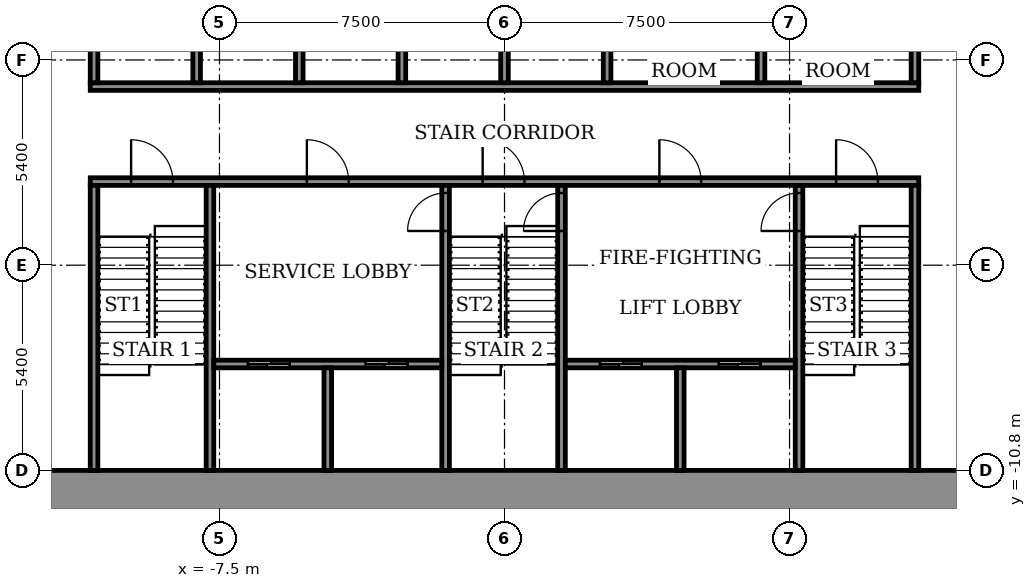
"""IFC4 building model, lengths in metres.
Left out: names, types, materials, properties, quantities, classifications, styles, units other than length and angle.
Written with IfcOpenShell. Run it as: python <this file> out.ifc"""

import sys

from ifc_helpers import new_model, si_unit, direction, frame, frame_2d, origin, place, context, subcontext, project, spatial, rectangle, extrude, element, fill, save


model = new_model("IFC4")
c1 = context("Model", 3, precision=1e-05, world=origin(), true_north=direction((0.0, 1.0)))
c2 = subcontext(c1, "Body", "Model", "MODEL_VIEW")
j1 = project(units=[si_unit("LENGTHUNIT", "METRE"), si_unit("PLANEANGLEUNIT", "RADIAN")], contexts=[c1])
p1 = place(None, origin())
s1 = spatial("IfcSite", under=j1, at=p1, CompositionType="ELEMENT")
p2 = place(p1, origin())
s2 = spatial("IfcBuilding", under=s1, at=p2, CompositionType="ELEMENT")
p3 = place(p2, frame((0.0, 0.0, 29.5)))
s3 = spatial("IfcBuildingStorey", under=s2, at=p3, CompositionType="ELEMENT", Elevation=29.5)
p4 = place(p3, frame((-15.0, -11.4, 0.0), z_axis=(0.0, 0.0, 1.0), x_axis=(1.0, 0.0, 0.0)))
e1 = element("IfcWall", 1, at=p4, inside=s3, PredefinedType="SHEAR", context=c2, shape_type="SweptSolid", body=[
    extrude(rectangle(XDim=30.0, YDim=1.2, at=frame_2d((15.0, 0.0))), origin(), (0.0, 0.0, 1.0), 4.6),
])
p5 = place(p3, frame((-10.9, -3.2, 0.0), z_axis=(0.0, 0.0, 1.0), x_axis=(1.0, 0.0, 0.0)))
e2 = element("IfcWall", 2, at=p5, inside=s3, PredefinedType="SHEAR", context=c2, shape_type="SweptSolid", body=[
    extrude(rectangle(XDim=21.8, YDim=0.2, at=frame_2d((10.9, 0.0))), origin(), (0.0, 0.0, 1.0), 4.05),
])
p6 = place(p5, frame((1.075, 0.0, 0.0)))
e3 = element("IfcOpeningElement", 3, at=p6, cuts=e2, PredefinedType="OPENING", context=c2, shape_type="SweptSolid", body=[
    extrude(rectangle(XDim=1.1, YDim=2.1, at=frame_2d((0.55, 1.05))), frame((0.0, 0.11, 0.0), z_axis=(0.0, -1.0, 0.0), x_axis=(1.0, 0.0, 0.0)), (0.0, 0.0, 1.0), 0.22),
])
p7 = place(p5, frame((10.325, 0.0, 0.0)))
e4 = element("IfcOpeningElement", 4, at=p7, cuts=e2, PredefinedType="OPENING", context=c2, shape_type="SweptSolid", body=[
    extrude(rectangle(XDim=1.1, YDim=2.1, at=frame_2d((0.55, 1.05))), frame((0.0, 0.11, 0.0), z_axis=(0.0, -1.0, 0.0), x_axis=(1.0, 0.0, 0.0)), (0.0, 0.0, 1.0), 0.22),
])
p8 = place(p5, frame((19.625, 0.0, 0.0)))
e5 = element("IfcOpeningElement", 5, at=p8, cuts=e2, PredefinedType="OPENING", context=c2, shape_type="SweptSolid", body=[
    extrude(rectangle(XDim=1.1, YDim=2.1, at=frame_2d((0.55, 1.05))), frame((0.0, 0.11, 0.0), z_axis=(0.0, -1.0, 0.0), x_axis=(1.0, 0.0, 0.0)), (0.0, 0.0, 1.0), 0.22),
])
p9 = place(p5, frame((5.7, 0.0, 0.0)))
e6 = element("IfcOpeningElement", 6, at=p9, cuts=e2, PredefinedType="OPENING", context=c2, shape_type="SweptSolid", body=[
    extrude(rectangle(XDim=1.1, YDim=2.1, at=frame_2d((0.55, 1.05))), frame((0.0, 0.11, 0.0), z_axis=(0.0, -1.0, 0.0), x_axis=(1.0, 0.0, 0.0)), (0.0, 0.0, 1.0), 0.22),
])
p10 = place(p5, frame((14.975, 0.0, 0.0)))
e7 = element("IfcOpeningElement", 7, at=p10, cuts=e2, PredefinedType="OPENING", context=c2, shape_type="SweptSolid", body=[
    extrude(rectangle(XDim=1.1, YDim=2.1, at=frame_2d((0.55, 1.05))), frame((0.0, 0.11, 0.0), z_axis=(0.0, -1.0, 0.0), x_axis=(1.0, 0.0, 0.0)), (0.0, 0.0, 1.0), 0.22),
])
p11 = place(p3, frame((-10.9, -0.7, 0.0), z_axis=(0.0, 0.0, 1.0), x_axis=(1.0, 0.0, 0.0)))
e8 = element("IfcWall", 8, at=p11, inside=s3, PredefinedType="SHEAR", context=c2, shape_type="SweptSolid", body=[
    extrude(rectangle(XDim=21.8, YDim=0.2, at=frame_2d((10.9, 0.0))), origin(), (0.0, 0.0, 1.0), 4.05),
])
for number, where, z_axis, x_axis in (
    (9, (-10.8, -10.8, 0.0), (0.0, 0.0, 1.0), (0.0, 1.0, 0.0)),
    (10, (-7.75, -10.8, 0.0), (0.0, 0.0, 1.0), (0.0, 1.0, 0.0)),
):
    element("IfcWall", number, at=place(p3, frame(where, z_axis=z_axis, x_axis=x_axis)), inside=s3, PredefinedType="SHEAR", context=c2, shape_type="SweptSolid", body=[
        extrude(rectangle(XDim=7.5, YDim=0.2, at=frame_2d((3.75, 0.0))), origin(), (0.0, 0.0, 1.0), 4.05),
    ])
p12 = place(p3, frame((-1.55, -10.8, 0.0), z_axis=(0.0, 0.0, 1.0), x_axis=(0.0, 1.0, 0.0)))
e11 = element("IfcWall", 11, at=p12, inside=s3, PredefinedType="SHEAR", context=c2, shape_type="SweptSolid", body=[
    extrude(rectangle(XDim=7.5, YDim=0.2, at=frame_2d((3.75, 0.0))), origin(), (0.0, 0.0, 1.0), 4.05),
])
p13 = place(p12, frame((6.3, 0.0, 0.0)))
e12 = element("IfcOpeningElement", 12, at=p13, cuts=e11, PredefinedType="OPENING", context=c2, shape_type="SweptSolid", body=[
    extrude(rectangle(XDim=1.0, YDim=2.1, at=frame_2d((0.5, 1.05))), frame((0.0, 0.11, 0.0), z_axis=(0.0, -1.0, 0.0), x_axis=(1.0, 0.0, 0.0)), (0.0, 0.0, 1.0), 0.22),
])
p14 = place(p3, frame((1.5, -10.8, 0.0), z_axis=(0.0, 0.0, 1.0), x_axis=(0.0, 1.0, 0.0)))
e13 = element("IfcWall", 13, at=p14, inside=s3, PredefinedType="SHEAR", context=c2, shape_type="SweptSolid", body=[
    extrude(rectangle(XDim=7.5, YDim=0.2, at=frame_2d((3.75, 0.0))), origin(), (0.0, 0.0, 1.0), 4.05),
])
p15 = place(p14, frame((6.3, 0.0, 0.0)))
e14 = element("IfcOpeningElement", 14, at=p15, cuts=e13, PredefinedType="OPENING", context=c2, shape_type="SweptSolid", body=[
    extrude(rectangle(XDim=1.0, YDim=2.1, at=frame_2d((0.5, 1.05))), frame((0.0, 0.11, 0.0), z_axis=(0.0, -1.0, 0.0), x_axis=(1.0, 0.0, 0.0)), (0.0, 0.0, 1.0), 0.22),
])
p16 = place(p3, frame((7.75, -10.8, 0.0), z_axis=(0.0, 0.0, 1.0), x_axis=(0.0, 1.0, 0.0)))
e15 = element("IfcWall", 15, at=p16, inside=s3, PredefinedType="SHEAR", context=c2, shape_type="SweptSolid", body=[
    extrude(rectangle(XDim=7.5, YDim=0.2, at=frame_2d((3.75, 0.0))), origin(), (0.0, 0.0, 1.0), 4.05),
])
p17 = place(p16, frame((6.3, 0.0, 0.0)))
e16 = element("IfcOpeningElement", 16, at=p17, cuts=e15, PredefinedType="OPENING", context=c2, shape_type="SweptSolid", body=[
    extrude(rectangle(XDim=1.0, YDim=2.1, at=frame_2d((0.5, 1.05))), frame((0.0, 0.11, 0.0), z_axis=(0.0, -1.0, 0.0), x_axis=(1.0, 0.0, 0.0)), (0.0, 0.0, 1.0), 0.22),
])
p18 = place(p3, frame((10.8, -10.8, 0.0), z_axis=(0.0, 0.0, 1.0), x_axis=(0.0, 1.0, 0.0)))
e17 = element("IfcWall", 17, at=p18, inside=s3, PredefinedType="SHEAR", context=c2, shape_type="SweptSolid", body=[
    extrude(rectangle(XDim=7.5, YDim=0.2, at=frame_2d((3.75, 0.0))), origin(), (0.0, 0.0, 1.0), 4.05),
])
p19 = place(p3, frame((-7.65, -8.0, 0.0), z_axis=(0.0, 0.0, 1.0), x_axis=(1.0, 0.0, 0.0)))
e18 = element("IfcWall", 18, at=p19, inside=s3, PredefinedType="SHEAR", context=c2, shape_type="SweptSolid", body=[
    extrude(rectangle(XDim=6.0, YDim=0.2, at=frame_2d((3.0, 0.0))), origin(), (0.0, 0.0, 1.0), 4.05),
])
p20 = place(p19, frame((0.9, 0.0, 0.0)))
e19 = element("IfcOpeningElement", 19, at=p20, cuts=e18, PredefinedType="OPENING", context=c2, shape_type="SweptSolid", body=[
    extrude(rectangle(XDim=1.1, YDim=2.1, at=frame_2d((0.55, 1.05))), frame((0.0, 0.11, 0.0), z_axis=(0.0, -1.0, 0.0), x_axis=(1.0, 0.0, 0.0)), (0.0, 0.0, 1.0), 0.22),
])
p21 = place(p19, frame((4.0, 0.0, 0.0)))
e20 = element("IfcOpeningElement", 20, at=p21, cuts=e18, PredefinedType="OPENING", context=c2, shape_type="SweptSolid", body=[
    extrude(rectangle(XDim=1.1, YDim=2.1, at=frame_2d((0.55, 1.05))), frame((0.0, 0.11, 0.0), z_axis=(0.0, -1.0, 0.0), x_axis=(1.0, 0.0, 0.0)), (0.0, 0.0, 1.0), 0.22),
])
p22 = place(p3, frame((-4.65, -10.8, 0.0), z_axis=(0.0, 0.0, 1.0), x_axis=(0.0, 1.0, 0.0)))
e21 = element("IfcWall", 21, at=p22, inside=s3, PredefinedType="SHEAR", context=c2, shape_type="SweptSolid", body=[
    extrude(rectangle(XDim=2.7, YDim=0.2, at=frame_2d((1.35, 0.0))), origin(), (0.0, 0.0, 1.0), 4.05),
])
p23 = place(p3, frame((1.6, -8.0, 0.0), z_axis=(0.0, 0.0, 1.0), x_axis=(1.0, 0.0, 0.0)))
e22 = element("IfcWall", 22, at=p23, inside=s3, PredefinedType="SHEAR", context=c2, shape_type="SweptSolid", body=[
    extrude(rectangle(XDim=6.05, YDim=0.2, at=frame_2d((3.025, 0.0))), origin(), (0.0, 0.0, 1.0), 4.05),
])
p24 = place(p23, frame((0.913, 0.0, 0.0)))
e23 = element("IfcOpeningElement", 23, at=p24, cuts=e22, PredefinedType="OPENING", context=c2, shape_type="SweptSolid", body=[
    extrude(rectangle(XDim=1.1, YDim=2.1, at=frame_2d((0.55, 1.05))), frame((0.0, 0.11, 0.0), z_axis=(0.0, -1.0, 0.0), x_axis=(1.0, 0.0, 0.0)), (0.0, 0.0, 1.0), 0.22),
])
p25 = place(p23, frame((4.038, 0.0, 0.0)))
e24 = element("IfcOpeningElement", 24, at=p25, cuts=e22, PredefinedType="OPENING", context=c2, shape_type="SweptSolid", body=[
    extrude(rectangle(XDim=1.1, YDim=2.1, at=frame_2d((0.55, 1.05))), frame((0.0, 0.11, 0.0), z_axis=(0.0, -1.0, 0.0), x_axis=(1.0, 0.0, 0.0)), (0.0, 0.0, 1.0), 0.22),
])
p26 = place(p3, frame((4.625, -10.8, 0.0), z_axis=(0.0, 0.0, 1.0), x_axis=(0.0, 1.0, 0.0)))
e25 = element("IfcWall", 25, at=p26, inside=s3, PredefinedType="SHEAR", context=c2, shape_type="SweptSolid", body=[
    extrude(rectangle(XDim=2.7, YDim=0.2, at=frame_2d((1.35, 0.0))), origin(), (0.0, 0.0, 1.0), 4.05),
])
for number, where, z_axis, x_axis in (
    (26, (-10.8, -0.6, 0.0), (0.0, 0.0, 1.0), (0.0, 1.0, 0.0)),
    (27, (-8.1, -0.6, 0.0), (0.0, 0.0, 1.0), (0.0, 1.0, 0.0)),
    (28, (-5.4, -0.6, 0.0), (0.0, 0.0, 1.0), (0.0, 1.0, 0.0)),
    (29, (-2.7, -0.6, 0.0), (0.0, 0.0, 1.0), (0.0, 1.0, 0.0)),
    (30, (0.0, -0.6, 0.0), (0.0, 0.0, 1.0), (0.0, 1.0, 0.0)),
    (31, (2.7, -0.6, 0.0), (0.0, 0.0, 1.0), (0.0, 1.0, 0.0)),
):
    element("IfcWall", number, at=place(p3, frame(where, z_axis=z_axis, x_axis=x_axis)), inside=s3, PredefinedType="SHEAR", context=c2, shape_type="SweptSolid", body=[
        extrude(rectangle(XDim=2.5, YDim=0.2, at=frame_2d((1.25, 0.0))), origin(), (0.0, 0.0, 1.0), 4.05),
    ])
for number, where, z_axis, x_axis in (
    (32, (6.75, -0.6, 0.0), (0.0, 0.0, 1.0), (0.0, 1.0, 0.0)),
    (33, (10.8, -0.6, 0.0), (0.0, 0.0, 1.0), (0.0, 1.0, 0.0)),
):
    element("IfcWall", number, at=place(p3, frame(where, z_axis=z_axis, x_axis=x_axis)), inside=s3, PredefinedType="STANDARD", context=c2, shape_type="SweptSolid", body=[
        extrude(rectangle(XDim=2.5, YDim=0.2, at=frame_2d((1.25, 0.0))), origin(), (0.0, 0.0, 1.0), 4.05),
    ])
p27 = place(p24, origin())
e34 = element("IfcDoor", 34, at=p27, inside=s3, OperationType="SLIDING_TO_LEFT", PredefinedType="DOOR", context=c2, shape_type="SweptSolid", body=[
    extrude(rectangle(XDim=1.1, YDim=2.1, at=frame_2d((0.55, 1.05))), frame((0.0, 0.025, 0.0), z_axis=(0.0, -1.0, 0.0), x_axis=(1.0, 0.0, 0.0)), (0.0, 0.0, 1.0), 0.05),
])
fill(e23, e34)
p28 = place(p20, origin())
e35 = element("IfcDoor", 35, at=p28, inside=s3, OperationType="SLIDING_TO_LEFT", PredefinedType="DOOR", context=c2, shape_type="SweptSolid", body=[
    extrude(rectangle(XDim=1.1, YDim=2.1, at=frame_2d((0.55, 1.05))), frame((0.0, 0.025, 0.0), z_axis=(0.0, -1.0, 0.0), x_axis=(1.0, 0.0, 0.0)), (0.0, 0.0, 1.0), 0.05),
])
fill(e19, e35)
p29 = place(p25, origin())
e36 = element("IfcDoor", 36, at=p29, inside=s3, OperationType="SLIDING_TO_LEFT", PredefinedType="DOOR", context=c2, shape_type="SweptSolid", body=[
    extrude(rectangle(XDim=1.1, YDim=2.1, at=frame_2d((0.55, 1.05))), frame((0.0, 0.025, 0.0), z_axis=(0.0, -1.0, 0.0), x_axis=(1.0, 0.0, 0.0)), (0.0, 0.0, 1.0), 0.05),
])
fill(e24, e36)
p30 = place(p21, origin())
e37 = element("IfcDoor", 37, at=p30, inside=s3, OperationType="SLIDING_TO_LEFT", PredefinedType="DOOR", context=c2, shape_type="SweptSolid", body=[
    extrude(rectangle(XDim=1.1, YDim=2.1, at=frame_2d((0.55, 1.05))), frame((0.0, 0.025, 0.0), z_axis=(0.0, -1.0, 0.0), x_axis=(1.0, 0.0, 0.0)), (0.0, 0.0, 1.0), 0.05),
])
fill(e20, e37)
p31 = place(p6, origin())
e38 = element("IfcDoor", 38, at=p31, inside=s3, OperationType="SINGLE_SWING_RIGHT", PredefinedType="DOOR", context=c2, shape_type="SweptSolid", body=[
    extrude(rectangle(XDim=1.1, YDim=2.1, at=frame_2d((0.55, 1.05))), frame((0.0, 0.025, 0.0), z_axis=(0.0, -1.0, 0.0), x_axis=(1.0, 0.0, 0.0)), (0.0, 0.0, 1.0), 0.05),
])
fill(e3, e38)
p32 = place(p7, origin())
e39 = element("IfcDoor", 39, at=p32, inside=s3, OperationType="SINGLE_SWING_RIGHT", PredefinedType="DOOR", context=c2, shape_type="SweptSolid", body=[
    extrude(rectangle(XDim=1.1, YDim=2.1, at=frame_2d((0.55, 1.05))), frame((0.0, 0.025, 0.0), z_axis=(0.0, -1.0, 0.0), x_axis=(1.0, 0.0, 0.0)), (0.0, 0.0, 1.0), 0.05),
])
fill(e4, e39)
p33 = place(p8, origin())
e40 = element("IfcDoor", 40, at=p33, inside=s3, OperationType="SINGLE_SWING_RIGHT", PredefinedType="DOOR", context=c2, shape_type="SweptSolid", body=[
    extrude(rectangle(XDim=1.1, YDim=2.1, at=frame_2d((0.55, 1.05))), frame((0.0, 0.025, 0.0), z_axis=(0.0, -1.0, 0.0), x_axis=(1.0, 0.0, 0.0)), (0.0, 0.0, 1.0), 0.05),
])
fill(e5, e40)
p34 = place(p9, origin())
e41 = element("IfcDoor", 41, at=p34, inside=s3, OperationType="SINGLE_SWING_LEFT", PredefinedType="DOOR", context=c2, shape_type="SweptSolid", body=[
    extrude(rectangle(XDim=1.1, YDim=2.1, at=frame_2d((0.55, 1.05))), frame((0.0, 0.025, 0.0), z_axis=(0.0, -1.0, 0.0), x_axis=(1.0, 0.0, 0.0)), (0.0, 0.0, 1.0), 0.05),
])
fill(e6, e41)
p35 = place(p10, origin())
e42 = element("IfcDoor", 42, at=p35, inside=s3, OperationType="SINGLE_SWING_LEFT", PredefinedType="DOOR", context=c2, shape_type="SweptSolid", body=[
    extrude(rectangle(XDim=1.1, YDim=2.1, at=frame_2d((0.55, 1.05))), frame((0.0, 0.025, 0.0), z_axis=(0.0, -1.0, 0.0), x_axis=(1.0, 0.0, 0.0)), (0.0, 0.0, 1.0), 0.05),
])
fill(e7, e42)
p36 = place(p13, origin())
e43 = element("IfcDoor", 43, at=p36, inside=s3, OperationType="SINGLE_SWING_RIGHT", PredefinedType="DOOR", context=c2, shape_type="SweptSolid", body=[
    extrude(rectangle(XDim=1.0, YDim=2.1, at=frame_2d((0.5, 1.05))), frame((0.0, 0.025, 0.0), z_axis=(0.0, -1.0, 0.0), x_axis=(1.0, 0.0, 0.0)), (0.0, 0.0, 1.0), 0.05),
])
fill(e12, e43)
p37 = place(p15, origin())
e44 = element("IfcDoor", 44, at=p37, inside=s3, OperationType="SINGLE_SWING_RIGHT", PredefinedType="DOOR", context=c2, shape_type="SweptSolid", body=[
    extrude(rectangle(XDim=1.0, YDim=2.1, at=frame_2d((0.5, 1.05))), frame((0.0, 0.025, 0.0), z_axis=(0.0, -1.0, 0.0), x_axis=(1.0, 0.0, 0.0)), (0.0, 0.0, 1.0), 0.05),
])
fill(e14, e44)
p38 = place(p17, origin())
e45 = element("IfcDoor", 45, at=p38, inside=s3, OperationType="SINGLE_SWING_RIGHT", PredefinedType="DOOR", context=c2, shape_type="SweptSolid", body=[
    extrude(rectangle(XDim=1.0, YDim=2.1, at=frame_2d((0.5, 1.05))), frame((0.0, 0.025, 0.0), z_axis=(0.0, -1.0, 0.0), x_axis=(1.0, 0.0, 0.0)), (0.0, 0.0, 1.0), 0.05),
])
fill(e16, e45)
save(model, sys.argv[1])
